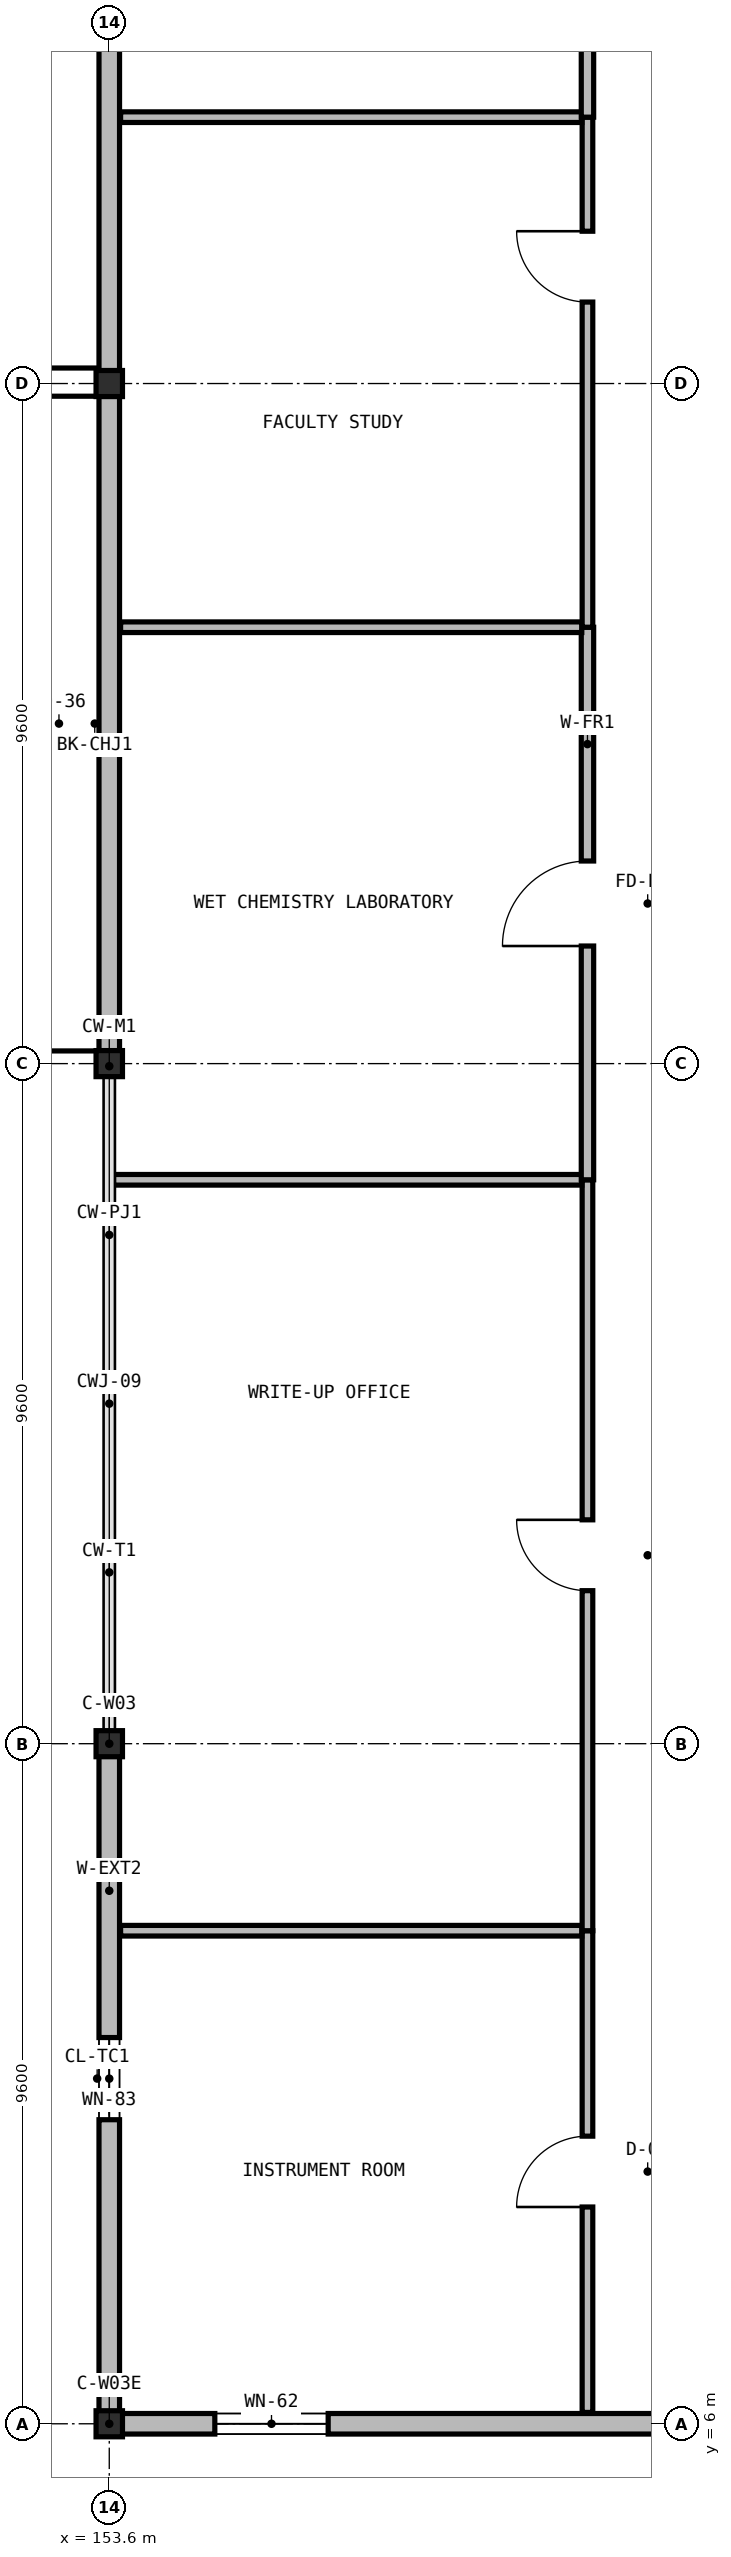
"""IFC4 building model, lengths in metres.
Left out: names, types, materials, properties, quantities, classifications, styles, units other than length and angle.
Written with IfcOpenShell. Run it as: python <this file> out.ifc"""

import sys

from ifc_helpers import new_model, si_unit, direction, frame, frame_2d, origin, origin_2d, place, context, subcontext, project, spatial, rectangle, i_section, extrude, element, fill, save


model = new_model("IFC4")
c1 = context("Model", 3, precision=1e-05, world=origin(), true_north=direction((0.0, 1.0)))
c2 = subcontext(c1, "Body", "Model", "MODEL_VIEW")
j1 = project(units=[si_unit("LENGTHUNIT", "METRE"), si_unit("PLANEANGLEUNIT", "RADIAN")], contexts=[c1])
p1 = place(None, origin())
s1 = spatial("IfcSite", under=j1, at=p1, CompositionType="ELEMENT")
p2 = place(p1, origin())
s2 = spatial("IfcBuilding", under=s1, at=p2, CompositionType="ELEMENT")
p3 = place(p2, frame((0.0, 0.0, 23.45)))
s3 = spatial("IfcBuildingStorey", under=s2, at=p3, CompositionType="ELEMENT", Elevation=23.45)
for number, where, z_axis, x_axis in (
    (1, (153.6, 6.0, 0.0), (0.0, 0.0, 1.0), (1.0, 0.0, 0.0)),
    (2, (153.6, 15.6, 0.0), (0.0, 0.0, 1.0), (1.0, 0.0, 0.0)),
    (3, (153.6, 25.2, 0.0), (0.0, 0.0, 1.0), (1.0, 0.0, 0.0)),
    (4, (153.6, 34.8, 0.0), (0.0, 0.0, 1.0), (1.0, 0.0, 0.0)),
):
    element("IfcColumn", number, at=place(p3, frame(where, z_axis=z_axis, x_axis=x_axis)), inside=s3, PredefinedType="COLUMN", context=c2, shape_type="SweptSolid", body=[
        extrude(i_section(OverallWidth=0.373, OverallDepth=0.368, WebThickness=0.017, FlangeThickness=0.027, at=origin_2d()), origin(), (0.0, 0.0, 1.0), 4.55),
    ])
p4 = place(p3, frame((153.6, 6.149, 0.0), z_axis=(0.0, 0.0, 1.0), x_axis=(0.0, 1.0, 0.0)))
e5 = element("IfcWall", 5, at=p4, inside=s3, PredefinedType="SOLIDWALL", context=c2, shape_type="SweptSolid", body=[
    extrude(rectangle(XDim=9.447, YDim=0.29, at=frame_2d((4.724, 0.0))), origin(), (0.0, 0.0, 1.0), 3.908),
])
p5 = place(p4, frame((4.143, 0.0, 0.95)))
e6 = element("IfcOpeningElement", 6, at=p5, cuts=e5, PredefinedType="OPENING", context=c2, shape_type="SweptSolid", body=[
    extrude(rectangle(XDim=1.16, YDim=1.72, at=frame_2d((0.58, 0.86))), frame((0.0, 0.155, 0.0), z_axis=(0.0, -1.0, 0.0), x_axis=(1.0, 0.0, 0.0)), (0.0, 0.0, 1.0), 0.31),
])
p6 = place(p3, frame((153.6, 25.204, 0.0), z_axis=(0.0, 0.0, 1.0), x_axis=(0.0, 1.0, 0.0)))
e7 = element("IfcWall", 7, at=p6, inside=s3, PredefinedType="SOLIDWALL", context=c2, shape_type="SweptSolid", body=[
    extrude(rectangle(XDim=9.592, YDim=0.29, at=frame_2d((4.796, 0.0))), origin(), (0.0, 0.0, 1.0), 3.908),
])
p7 = place(p3, frame((153.6, 34.804, 0.0), z_axis=(0.0, 0.0, 1.0), x_axis=(0.0, 1.0, 0.0)))
e8 = element("IfcWall", 8, at=p7, inside=s3, PredefinedType="SOLIDWALL", context=c2, shape_type="SweptSolid", body=[
    extrude(rectangle(XDim=9.592, YDim=0.29, at=frame_2d((4.796, 0.0))), origin(), (0.0, 0.0, 1.0), 3.908),
])
p8 = place(p3, frame((163.196, 6.0, 0.0), z_axis=(0.0, 0.0, 1.0), x_axis=(-1.0, 0.0, 0.0)))
e9 = element("IfcWall", 9, at=p8, inside=s3, PredefinedType="SOLIDWALL", context=c2, shape_type="SweptSolid", body=[
    extrude(rectangle(XDim=9.741, YDim=0.29, at=frame_2d((4.871, 0.0))), origin(), (0.0, 0.0, 1.0), 3.899),
])
p9 = place(p8, frame((6.506, 0.0, 0.95)))
e10 = element("IfcOpeningElement", 10, at=p9, cuts=e9, PredefinedType="OPENING", context=c2, shape_type="SweptSolid", body=[
    extrude(rectangle(XDim=1.6, YDim=1.72, at=frame_2d((0.8, 0.86))), frame((0.0, 0.155, 0.0), z_axis=(0.0, -1.0, 0.0), x_axis=(1.0, 0.0, 0.0)), (0.0, 0.0, 1.0), 0.31),
])
p10 = place(p3, frame((160.35, 6.16, 0.0), z_axis=(0.0, 0.0, 1.0), x_axis=(0.0, 1.0, 0.0)))
e11 = element("IfcWall", 11, at=p10, inside=s3, PredefinedType="PARTITIONING", context=c2, shape_type="SweptSolid", body=[
    extrude(rectangle(XDim=6.8, YDim=0.15, at=frame_2d((3.4, 0.0))), origin(), (0.0, 0.0, 1.0), 4.3),
])
p11 = place(p10, frame((2.9, 0.0, 0.0)))
e12 = element("IfcOpeningElement", 12, at=p11, cuts=e11, PredefinedType="OPENING", context=c2, shape_type="SweptSolid", body=[
    extrude(rectangle(XDim=1.0, YDim=2.2, at=frame_2d((0.5, 1.1))), frame((0.0, 0.085, 0.0), z_axis=(0.0, -1.0, 0.0), x_axis=(1.0, 0.0, 0.0)), (0.0, 0.0, 1.0), 0.17),
])
p12 = place(p3, frame((153.76, 12.96, 0.0), z_axis=(0.0, 0.0, 1.0), x_axis=(1.0, 0.0, 0.0)))
e13 = element("IfcWall", 13, at=p12, inside=s3, PredefinedType="PARTITIONING", context=c2, shape_type="SweptSolid", body=[
    extrude(rectangle(XDim=6.51, YDim=0.15, at=frame_2d((3.255, 0.0))), origin(), (0.0, 0.0, 1.0), 4.3),
])
p13 = place(p3, frame((160.35, 12.96, 0.0), z_axis=(0.0, 0.0, 1.0), x_axis=(0.0, 1.0, 0.0)))
e14 = element("IfcWall", 14, at=p13, inside=s3, PredefinedType="PARTITIONING", context=c2, shape_type="SweptSolid", body=[
    extrude(rectangle(XDim=10.6, YDim=0.15, at=frame_2d((5.3, 0.0))), origin(), (0.0, 0.0, 1.0), 4.3),
])
p14 = place(p13, frame((4.8, 0.0, 0.0)))
e15 = element("IfcOpeningElement", 15, at=p14, cuts=e14, PredefinedType="OPENING", context=c2, shape_type="SweptSolid", body=[
    extrude(rectangle(XDim=1.0, YDim=2.2, at=frame_2d((0.5, 1.1))), frame((0.0, 0.085, 0.0), z_axis=(0.0, -1.0, 0.0), x_axis=(1.0, 0.0, 0.0)), (0.0, 0.0, 1.0), 0.17),
])
p15 = place(p3, frame((153.66, 23.56, 0.0), z_axis=(0.0, 0.0, 1.0), x_axis=(1.0, 0.0, 0.0)))
e16 = element("IfcWall", 16, at=p15, inside=s3, PredefinedType="PARTITIONING", context=c2, shape_type="SweptSolid", body=[
    extrude(rectangle(XDim=6.61, YDim=0.15, at=frame_2d((3.305, 0.0))), origin(), (0.0, 0.0, 1.0), 4.3),
])
p16 = place(p3, frame((160.35, 23.56, 0.0), z_axis=(0.0, 0.0, 1.0), x_axis=(0.0, 1.0, 0.0)))
e17 = element("IfcWall", 17, at=p16, inside=s3, PredefinedType="PARTITIONING", context=c2, shape_type="SweptSolid", body=[
    extrude(rectangle(XDim=7.8, YDim=0.175, at=frame_2d((3.9, 0.0))), origin(), (0.0, 0.0, 1.0), 4.3),
])
p17 = place(p16, frame((3.3, 0.0, 0.0)))
e18 = element("IfcOpeningElement", 18, at=p17, cuts=e17, PredefinedType="OPENING", context=c2, shape_type="SweptSolid", body=[
    extrude(rectangle(XDim=1.2, YDim=2.2, at=frame_2d((0.6, 1.1))), frame((0.0, 0.097, 0.0), z_axis=(0.0, -1.0, 0.0), x_axis=(1.0, 0.0, 0.0)), (0.0, 0.0, 1.0), 0.195),
])
p18 = place(p3, frame((153.76, 31.36, 0.0), z_axis=(0.0, 0.0, 1.0), x_axis=(1.0, 0.0, 0.0)))
e19 = element("IfcWall", 19, at=p18, inside=s3, PredefinedType="PARTITIONING", context=c2, shape_type="SweptSolid", body=[
    extrude(rectangle(XDim=6.51, YDim=0.15, at=frame_2d((3.255, 0.0))), origin(), (0.0, 0.0, 1.0), 4.3),
])
p19 = place(p3, frame((160.35, 31.36, 0.0), z_axis=(0.0, 0.0, 1.0), x_axis=(0.0, 1.0, 0.0)))
e20 = element("IfcWall", 20, at=p19, inside=s3, PredefinedType="PARTITIONING", context=c2, shape_type="SweptSolid", body=[
    extrude(rectangle(XDim=7.2, YDim=0.15, at=frame_2d((3.6, 0.0))), origin(), (0.0, 0.0, 1.0), 4.3),
])
p20 = place(p19, frame((4.59, 0.0, 0.0)))
e21 = element("IfcOpeningElement", 21, at=p20, cuts=e20, PredefinedType="OPENING", context=c2, shape_type="SweptSolid", body=[
    extrude(rectangle(XDim=1.0, YDim=2.2, at=frame_2d((0.5, 1.1))), frame((0.0, 0.085, 0.0), z_axis=(0.0, -1.0, 0.0), x_axis=(1.0, 0.0, 0.0)), (0.0, 0.0, 1.0), 0.17),
])
p21 = place(p3, frame((153.76, 38.56, 0.0), z_axis=(0.0, 0.0, 1.0), x_axis=(1.0, 0.0, 0.0)))
e22 = element("IfcWall", 22, at=p21, inside=s3, PredefinedType="PARTITIONING", context=c2, shape_type="SweptSolid", body=[
    extrude(rectangle(XDim=6.51, YDim=0.15, at=frame_2d((3.255, 0.0))), origin(), (0.0, 0.0, 1.0), 4.3),
])
p22 = place(p3, frame((160.35, 38.56, 0.0), z_axis=(0.0, 0.0, 1.0), x_axis=(0.0, 1.0, 0.0)))
e23 = element("IfcWall", 23, at=p22, inside=s3, PredefinedType="PARTITIONING", context=c2, shape_type="SweptSolid", body=[
    extrude(rectangle(XDim=6.8, YDim=0.175, at=frame_2d((3.4, 0.0))), origin(), (0.0, 0.0, 1.0), 4.3),
])
p23 = place(p22, frame((2.8, 0.0, 0.0)))
e24 = element("IfcOpeningElement", 24, at=p23, cuts=e23, PredefinedType="OPENING", context=c2, shape_type="SweptSolid", body=[
    extrude(rectangle(XDim=1.2, YDim=2.2, at=frame_2d((0.6, 1.1))), frame((0.0, 0.097, 0.0), z_axis=(0.0, -1.0, 0.0), x_axis=(1.0, 0.0, 0.0)), (0.0, 0.0, 1.0), 0.195),
])
p24 = place(p5, origin())
e25 = element("IfcWindow", 25, at=p24, inside=s3, PartitioningType="SINGLE_PANEL", PredefinedType="WINDOW", context=c2, shape_type="SweptSolid", body=[
    extrude(rectangle(XDim=1.16, YDim=1.72, at=frame_2d((0.58, 0.86))), frame((0.0, 0.03, 0.0), z_axis=(0.0, -1.0, 0.0), x_axis=(1.0, 0.0, 0.0)), (0.0, 0.0, 1.0), 0.06),
])
fill(e6, e25)
p25 = place(p9, origin())
e26 = element("IfcWindow", 26, at=p25, inside=s3, PartitioningType="SINGLE_PANEL", PredefinedType="WINDOW", context=c2, shape_type="SweptSolid", body=[
    extrude(rectangle(XDim=1.6, YDim=1.72, at=frame_2d((0.8, 0.86))), frame((0.0, 0.03, 0.0), z_axis=(0.0, -1.0, 0.0), x_axis=(1.0, 0.0, 0.0)), (0.0, 0.0, 1.0), 0.06),
])
fill(e10, e26)
p26 = place(p11, origin())
e27 = element("IfcDoor", 27, at=p26, inside=s3, OperationType="SINGLE_SWING_LEFT", PredefinedType="DOOR", context=c2, shape_type="SweptSolid", body=[
    extrude(rectangle(XDim=1.0, YDim=2.2, at=frame_2d((0.5, 1.1))), frame((0.0, 0.025, 0.0), z_axis=(0.0, -1.0, 0.0), x_axis=(1.0, 0.0, 0.0)), (0.0, 0.0, 1.0), 0.05),
])
fill(e12, e27)
p27 = place(p14, origin())
e28 = element("IfcDoor", 28, at=p27, inside=s3, OperationType="SINGLE_SWING_RIGHT", PredefinedType="DOOR", context=c2, shape_type="SweptSolid", body=[
    extrude(rectangle(XDim=1.0, YDim=2.2, at=frame_2d((0.5, 1.1))), frame((0.0, 0.025, 0.0), z_axis=(0.0, -1.0, 0.0), x_axis=(1.0, 0.0, 0.0)), (0.0, 0.0, 1.0), 0.05),
])
fill(e15, e28)
p28 = place(p17, origin())
e29 = element("IfcDoor", 29, at=p28, inside=s3, OperationType="SINGLE_SWING_LEFT", PredefinedType="DOOR", context=c2, shape_type="SweptSolid", body=[
    extrude(rectangle(XDim=1.2, YDim=2.2, at=frame_2d((0.6, 1.1))), frame((0.0, 0.025, 0.0), z_axis=(0.0, -1.0, 0.0), x_axis=(1.0, 0.0, 0.0)), (0.0, 0.0, 1.0), 0.05),
])
fill(e18, e29)
p29 = place(p20, origin())
e30 = element("IfcDoor", 30, at=p29, inside=s3, OperationType="SINGLE_SWING_RIGHT", PredefinedType="DOOR", context=c2, shape_type="SweptSolid", body=[
    extrude(rectangle(XDim=1.0, YDim=2.2, at=frame_2d((0.5, 1.1))), frame((0.0, 0.025, 0.0), z_axis=(0.0, -1.0, 0.0), x_axis=(1.0, 0.0, 0.0)), (0.0, 0.0, 1.0), 0.05),
])
fill(e21, e30)
save(model, sys.argv[1])
